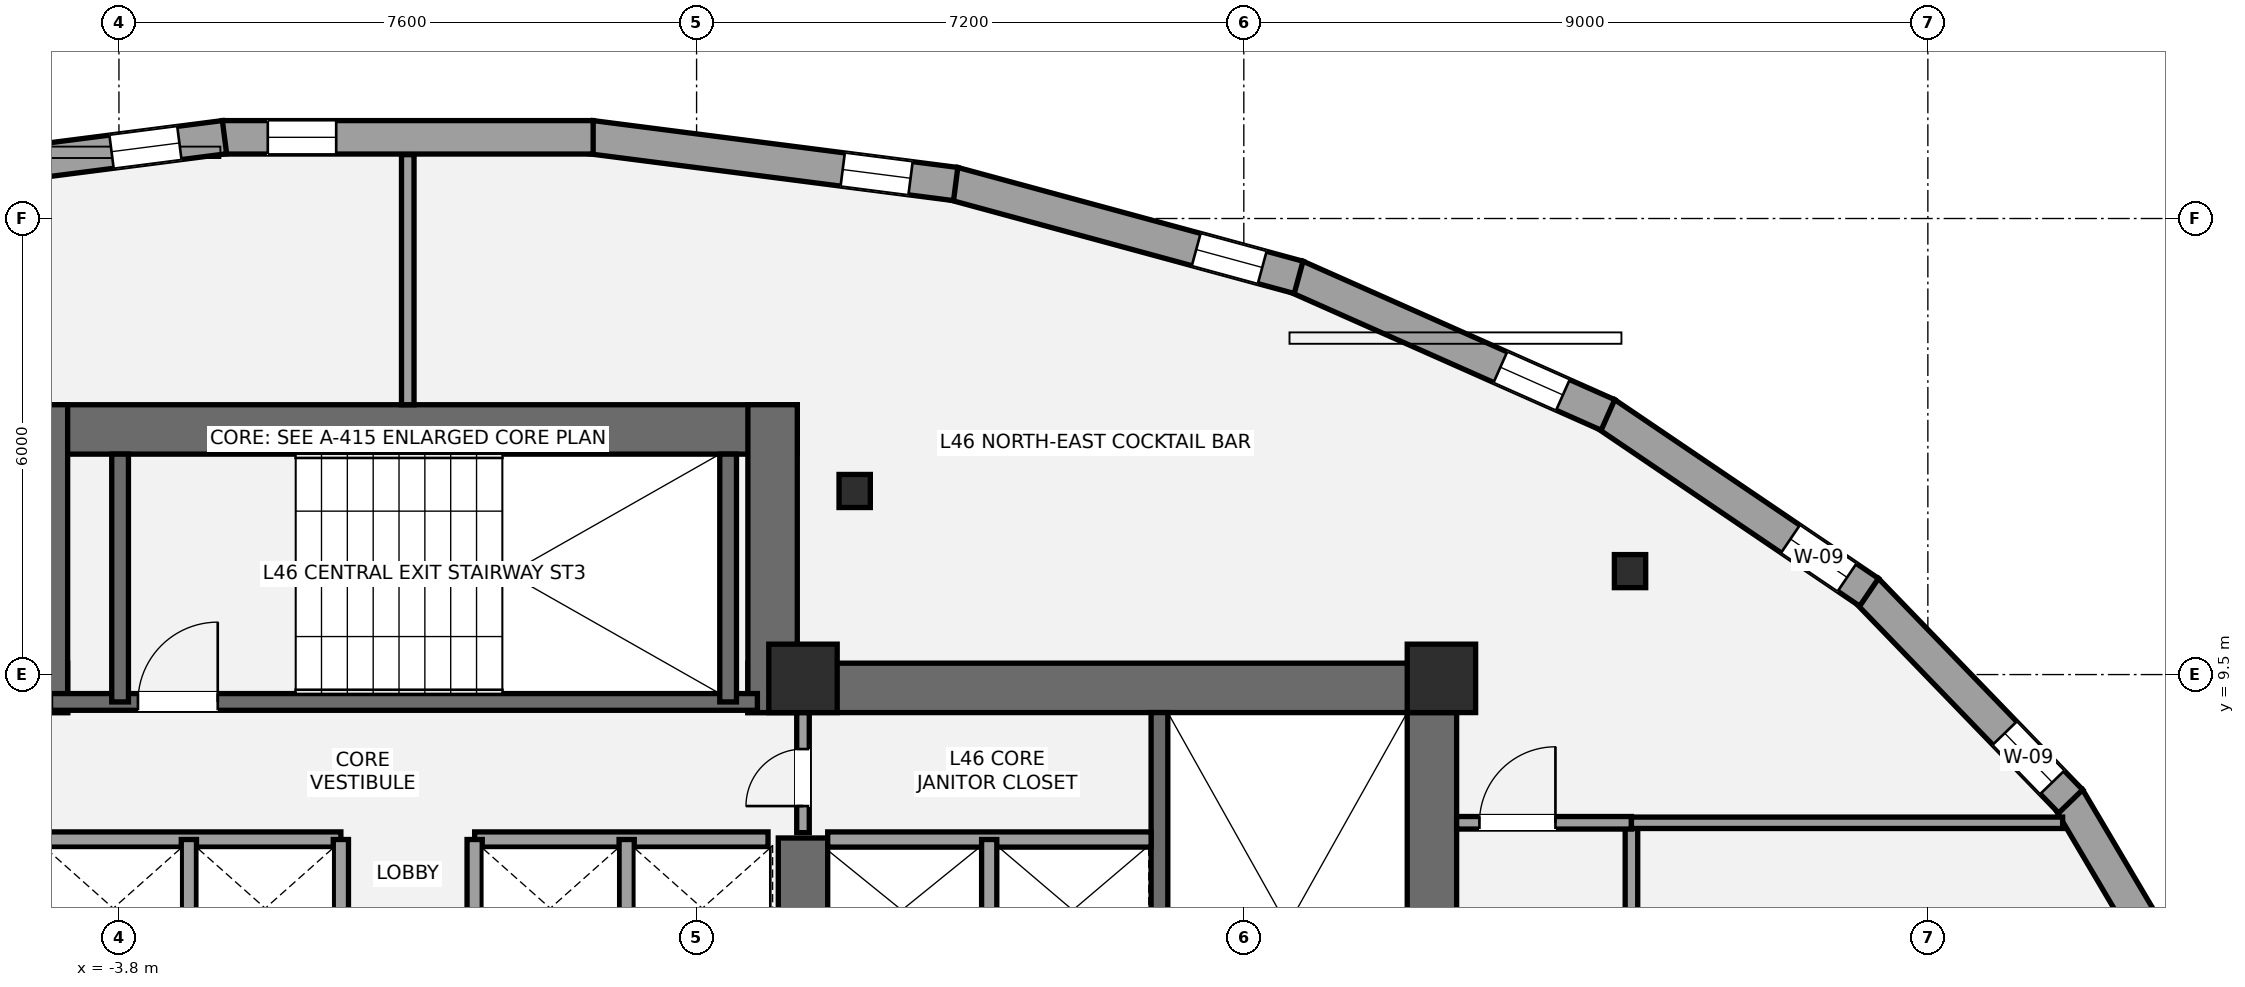
"""IFC4 building model, lengths in metres.
Left out: names, types, materials, properties, quantities, classifications, styles, units other than length and angle.
Written with IfcOpenShell. Run it as: python <this file> out.ifc"""

import sys

from ifc_helpers import new_model, si_unit, direction, frame, frame_2d, origin, origin_2d, place, context, subcontext, project, spatial, rectangle, i_section, extrude, element, fill, save


model = new_model("IFC4")
c1 = context("Model", 3, precision=1e-05, world=origin(), true_north=direction((0.0, 1.0)))
c2 = subcontext(c1, "Body", "Model", "MODEL_VIEW")
j1 = project(units=[si_unit("LENGTHUNIT", "METRE"), si_unit("PLANEANGLEUNIT", "RADIAN")], contexts=[c1])
p1 = place(None, origin())
s1 = spatial("IfcSite", under=j1, at=p1, CompositionType="ELEMENT")
p2 = place(p1, origin())
s2 = spatial("IfcBuilding", under=s1, at=p2, CompositionType="ELEMENT")
p3 = place(p2, frame((0.0, 0.0, 169.4)))
s3 = spatial("IfcBuildingStorey", under=s2, at=p3, CompositionType="ELEMENT", Elevation=169.4)
p4 = place(p3, frame((-13.8, 9.325, 0.0), z_axis=(0.0, 0.0, 1.0), x_axis=(1.0, 0.0, 0.0)))
e1 = element("IfcWall", 1, at=p4, inside=s3, PredefinedType="SHEAR", context=c2, shape_type="SweptSolid", body=[
    extrude(rectangle(XDim=9.325, YDim=0.65, at=frame_2d((4.663, 0.0))), origin(), (0.0, 0.0, 1.0), 3.2),
])
p5 = place(p3, frame((13.475, 1.2, 0.0), z_axis=(0.0, 0.0, 1.0), x_axis=(0.0, 1.0, 0.0)))
e2 = element("IfcWall", 2, at=p5, inside=s3, PredefinedType="SHEAR", context=c2, shape_type="SweptSolid", body=[
    extrude(rectangle(XDim=8.45, YDim=0.65, at=frame_2d((4.225, 0.0))), origin(), (0.0, 0.0, 1.0), 3.2),
])
p6 = place(p3, frame((4.475, 9.325, 0.0), z_axis=(0.0, 0.0, 1.0), x_axis=(1.0, 0.0, 0.0)))
e3 = element("IfcWall", 3, at=p6, inside=s3, PredefinedType="SHEAR", context=c2, shape_type="SweptSolid", body=[
    extrude(rectangle(XDim=9.325, YDim=0.65, at=frame_2d((4.663, 0.0))), origin(), (0.0, 0.0, 1.0), 3.2),
])
p7 = place(p3, frame((5.2, 5.35, 0.0), z_axis=(0.0, 0.0, 1.0), x_axis=(0.0, 1.0, 0.0)))
e4 = element("IfcWall", 4, at=p7, inside=s3, PredefinedType="SHEAR", context=c2, shape_type="SweptSolid", body=[
    extrude(rectangle(XDim=2.0, YDim=0.65, at=frame_2d((1.0, 0.0))), origin(), (0.0, 0.0, 1.0), 3.2),
])
p8 = place(p3, frame((9.89, 1.85, 0.0), z_axis=(0.0, 0.0, 1.0), x_axis=(0.0, 1.0, 0.0)))
e5 = element("IfcWall", 5, at=p8, inside=s3, PredefinedType="SHEAR", context=c2, shape_type="SweptSolid", body=[
    extrude(rectangle(XDim=7.15, YDim=0.22, at=frame_2d((3.575, 0.0))), origin(), (0.0, 0.0, 1.0), 3.2),
])
p9 = place(p3, frame((-5.125, 12.725, 0.0), z_axis=(0.0, 0.0, 1.0), x_axis=(1.0, 0.0, 0.0)))
e6 = element("IfcWall", 6, at=p9, inside=s3, PredefinedType="SHEAR", context=c2, shape_type="SweptSolid", body=[
    extrude(rectangle(XDim=10.25, YDim=0.65, at=frame_2d((5.125, 0.0))), origin(), (0.0, 0.0, 1.0), 3.2),
])
for number, where, z_axis, x_axis in (
    (7, (-4.8, 9.0, 0.0), (0.0, 0.0, 1.0), (0.0, 1.0, 0.0)),
    (8, (4.8, 9.0, 0.0), (0.0, 0.0, 1.0), (0.0, 1.0, 0.0)),
):
    element("IfcWall", number, at=place(p3, frame(where, z_axis=z_axis, x_axis=x_axis)), inside=s3, PredefinedType="SHEAR", context=c2, shape_type="SweptSolid", body=[
        extrude(rectangle(XDim=4.05, YDim=0.65, at=frame_2d((2.025, 0.0))), origin(), (0.0, 0.0, 1.0), 3.2),
    ])
p10 = place(p3, frame((-4.7, 9.14, 0.0), z_axis=(0.0, 0.0, 1.0), x_axis=(1.0, 0.0, 0.0)))
e9 = element("IfcWall", 9, at=p10, inside=s3, PredefinedType="SHEAR", context=c2, shape_type="SweptSolid", body=[
    extrude(rectangle(XDim=9.3, YDim=0.22, at=frame_2d((4.65, 0.0))), origin(), (0.0, 0.0, 1.0), 3.2),
])
p11 = place(p10, frame((1.15, 0.0, 0.0)))
e10 = element("IfcOpeningElement", 10, at=p11, cuts=e9, PredefinedType="OPENING", context=c2, shape_type="SweptSolid", body=[
    extrude(rectangle(XDim=1.05, YDim=2.15, at=frame_2d((0.525, 1.075))), frame((0.0, 0.12, 0.0), z_axis=(0.0, -1.0, 0.0), x_axis=(1.0, 0.0, 0.0)), (0.0, 0.0, 1.0), 0.24),
])
for number, where, z_axis, x_axis in (
    (11, (-3.785, 9.14, 0.0), (0.0, 0.0, 1.0), (0.0, 1.0, 0.0)),
    (12, (4.215, 9.14, 0.0), (0.0, 0.0, 1.0), (0.0, 1.0, 0.0)),
):
    element("IfcWall", number, at=place(p3, frame(where, z_axis=z_axis, x_axis=x_axis)), inside=s3, PredefinedType="SHEAR", context=c2, shape_type="SweptSolid", body=[
        extrude(rectangle(XDim=3.26, YDim=0.22, at=frame_2d((1.63, 0.0))), origin(), (0.0, 0.0, 1.0), 3.2),
    ])
for number, where, z_axis, x_axis in (
    (13, (5.2, 9.45, 0.0), (0.0, 0.0, 1.0), (1.0, 0.0, 0.0)),
    (14, (13.6, 9.45, 0.0), (0.0, 0.0, 1.0), (1.0, 0.0, 0.0)),
):
    element("IfcColumn", number, at=place(p3, frame(where, z_axis=z_axis, x_axis=x_axis)), inside=s3, PredefinedType="COLUMN", context=c2, shape_type="SweptSolid", body=[
        extrude(rectangle(XDim=0.9, YDim=0.9, at=origin_2d()), origin(), (0.0, 0.0, 1.0), 3.2),
    ])
for number, where, z_axis, x_axis in (
    (15, (16.082, 10.861, 0.0), (0.0, 0.0, 1.0), (1.0, 0.0, 0.0)),
    (16, (5.88, 11.915, 0.0), (0.0, 0.0, 1.0), (1.0, 0.0, 0.0)),
):
    element("IfcColumn", number, at=place(p3, frame(where, z_axis=z_axis, x_axis=x_axis)), inside=s3, PredefinedType="COLUMN", context=c2, shape_type="SweptSolid", body=[
        extrude(i_section(OverallWidth=0.412, OverallDepth=0.435, WebThickness=0.036, FlangeThickness=0.057, at=origin_2d()), origin(), (0.0, 0.0, 1.0), 3.2),
    ])
p12 = place(p3, frame((21.847, 7.873, 0.0), z_axis=(0.0, 0.0, 1.0), x_axis=(0.508883387051, -0.860835465338, 0.0)))
e17 = element("IfcWall", 17, at=p12, inside=s3, PredefinedType="STANDARD", context=c2, shape_type="SweptSolid", body=[
    extrude(rectangle(XDim=3.577, YDim=0.44, at=frame_2d((1.788, 0.0))), origin(), (0.0, 0.0, 1.0), 2.315),
])
p13 = place(p3, frame((19.192, 10.612, 0.0), z_axis=(0.0, 0.0, 1.0), x_axis=(0.694975307772, -0.719033602544, 0.0)))
e18 = element("IfcWall", 18, at=p13, inside=s3, PredefinedType="STANDARD", context=c2, shape_type="SweptSolid", body=[
    extrude(rectangle(XDim=3.866, YDim=0.44, at=frame_2d((1.933, 0.0))), origin(), (0.0, 0.0, 1.0), 2.315),
])
p14 = place(p13, frame((2.618, 0.0, 0.58)))
e19 = element("IfcOpeningElement", 19, at=p14, cuts=e18, PredefinedType="OPENING", context=c2, shape_type="SweptSolid", body=[
    extrude(rectangle(XDim=0.9, YDim=1.35, at=frame_2d((0.45, 0.675))), frame((0.0, 0.23, 0.0), z_axis=(0.0, -1.0, 0.0), x_axis=(1.0, 0.0, 0.0)), (0.0, 0.0, 1.0), 0.46),
])
p15 = place(p3, frame((15.757, 12.935, 0.0), z_axis=(0.0, 0.0, 1.0), x_axis=(0.827760762475, -0.561081206338, 0.0)))
e20 = element("IfcWall", 20, at=p15, inside=s3, PredefinedType="STANDARD", context=c2, shape_type="SweptSolid", body=[
    extrude(rectangle(XDim=4.192, YDim=0.44, at=frame_2d((2.096, 0.0))), origin(), (0.0, 0.0, 1.0), 2.319),
])
p16 = place(p15, frame((2.942, 0.0, 0.58)))
e21 = element("IfcOpeningElement", 21, at=p16, cuts=e20, PredefinedType="OPENING", context=c2, shape_type="SweptSolid", body=[
    extrude(rectangle(XDim=0.9, YDim=1.35, at=frame_2d((0.45, 0.675))), frame((0.0, 0.23, 0.0), z_axis=(0.0, -1.0, 0.0), x_axis=(1.0, 0.0, 0.0)), (0.0, 0.0, 1.0), 0.46),
])
p17 = place(p3, frame((11.69, 14.737, 0.0), z_axis=(0.0, 0.0, 1.0), x_axis=(0.913907994914, -0.405921392431, 0.0)))
e22 = element("IfcWall", 22, at=p17, inside=s3, PredefinedType="STANDARD", context=c2, shape_type="SweptSolid", body=[
    extrude(rectangle(XDim=4.487, YDim=0.44, at=frame_2d((2.244, 0.0))), origin(), (0.0, 0.0, 1.0), 2.315),
])
p18 = place(p17, frame((2.939, 0.0, 0.58)))
e23 = element("IfcOpeningElement", 23, at=p18, cuts=e22, PredefinedType="OPENING", context=c2, shape_type="SweptSolid", body=[
    extrude(rectangle(XDim=0.9, YDim=1.35, at=frame_2d((0.45, 0.675))), frame((0.0, 0.23, 0.0), z_axis=(0.0, -1.0, 0.0), x_axis=(1.0, 0.0, 0.0)), (0.0, 0.0, 1.0), 0.46),
])
p19 = place(p3, frame((7.179, 15.959, 0.0), z_axis=(0.0, 0.0, 1.0), x_axis=(0.965037424263, -0.262112132058, 0.0)))
e24 = element("IfcWall", 24, at=p19, inside=s3, PredefinedType="STANDARD", context=c2, shape_type="SweptSolid", body=[
    extrude(rectangle(XDim=4.707, YDim=0.44, at=frame_2d((2.353, 0.0))), origin(), (0.0, 0.0, 1.0), 2.315),
])
p20 = place(p19, frame((3.31, 0.0, 0.58)))
e25 = element("IfcOpeningElement", 25, at=p20, cuts=e24, PredefinedType="OPENING", context=c2, shape_type="SweptSolid", body=[
    extrude(rectangle(XDim=0.9, YDim=1.35, at=frame_2d((0.45, 0.675))), frame((0.0, 0.23, 0.0), z_axis=(0.0, -1.0, 0.0), x_axis=(1.0, 0.0, 0.0)), (0.0, 0.0, 1.0), 0.46),
])
p21 = place(p3, frame((2.411, 16.57, 0.0), z_axis=(0.0, 0.0, 1.0), x_axis=(0.991852910824, -0.127388395426, 0.0)))
e26 = element("IfcWall", 26, at=p21, inside=s3, PredefinedType="STANDARD", context=c2, shape_type="SweptSolid", body=[
    extrude(rectangle(XDim=4.837, YDim=0.44, at=frame_2d((2.418, 0.0))), origin(), (0.0, 0.0, 1.0), 2.315),
])
p22 = place(p21, frame((3.339, 0.0, 0.58)))
e27 = element("IfcOpeningElement", 27, at=p22, cuts=e26, PredefinedType="OPENING", context=c2, shape_type="SweptSolid", body=[
    extrude(rectangle(XDim=0.9, YDim=1.35, at=frame_2d((0.45, 0.675))), frame((0.0, 0.23, 0.0), z_axis=(0.0, -1.0, 0.0), x_axis=(1.0, 0.0, 0.0)), (0.0, 0.0, 1.0), 0.46),
])
p23 = place(p3, frame((-2.439, 16.568, 0.0), z_axis=(0.0, 0.0, 1.0), x_axis=(1.0, 0.0, 0.0)))
e28 = element("IfcWall", 28, at=p23, inside=s3, PredefinedType="STANDARD", context=c2, shape_type="SweptSolid", body=[
    extrude(rectangle(XDim=4.878, YDim=0.44, at=frame_2d((2.439, 0.0))), origin(), (0.0, 0.0, 1.0), 2.315),
])
p24 = place(p23, frame((0.598, 0.0, 0.58)))
e29 = element("IfcOpeningElement", 29, at=p24, cuts=e28, PredefinedType="OPENING", context=c2, shape_type="SweptSolid", body=[
    extrude(rectangle(XDim=0.9, YDim=1.35, at=frame_2d((0.45, 0.675))), frame((0.0, 0.23, 0.0), z_axis=(0.0, -1.0, 0.0), x_axis=(1.0, 0.0, 0.0)), (0.0, 0.0, 1.0), 0.46),
])
p25 = place(p3, frame((-7.209, 15.954, 0.0), z_axis=(0.0, 0.0, 1.0), x_axis=(0.991852910824, 0.127388395426, 0.0)))
e30 = element("IfcWall", 30, at=p25, inside=s3, PredefinedType="STANDARD", context=c2, shape_type="SweptSolid", body=[
    extrude(rectangle(XDim=4.837, YDim=0.44, at=frame_2d((2.418, 0.0))), origin(), (0.0, 0.0, 1.0), 2.315),
])
p26 = place(p25, frame((3.339, 0.0, 0.58)))
e31 = element("IfcOpeningElement", 31, at=p26, cuts=e30, PredefinedType="OPENING", context=c2, shape_type="SweptSolid", body=[
    extrude(rectangle(XDim=0.9, YDim=1.35, at=frame_2d((0.45, 0.675))), frame((0.0, 0.23, 0.0), z_axis=(0.0, -1.0, 0.0), x_axis=(1.0, 0.0, 0.0)), (0.0, 0.0, 1.0), 0.46),
])
p27 = place(p3, frame((5.525, 7.33, 0.0), z_axis=(0.0, 0.0, 1.0), x_axis=(1.0, 0.0, 0.0)))
e32 = element("IfcWall", 32, at=p27, inside=s3, PredefinedType="SOLIDWALL", context=c2, shape_type="SweptSolid", body=[
    extrude(rectangle(XDim=4.255, YDim=0.2, at=frame_2d((2.127, 0.0))), origin(), (0.0, 0.0, 1.0), 3.02),
])
p28 = place(p3, frame((7.65, 5.47, 0.0), z_axis=(0.0, 0.0, 1.0), x_axis=(0.0, 1.0, 0.0)))
e33 = element("IfcWall", 33, at=p28, inside=s3, PredefinedType="SOLIDWALL", context=c2, shape_type="SweptSolid", body=[
    extrude(rectangle(XDim=1.86, YDim=0.2, at=frame_2d((0.93, 0.0))), origin(), (0.0, 0.0, 1.0), 3.02),
])
for number, where, z_axis, x_axis in (
    (34, (-4.74, 7.33, 0.0), (0.0, 0.0, 1.0), (1.0, 0.0, 0.0)),
    (35, (0.88, 7.33, 0.0), (0.0, 0.0, 1.0), (1.0, 0.0, 0.0)),
):
    element("IfcWall", number, at=place(p3, frame(where, z_axis=z_axis, x_axis=x_axis)), inside=s3, PredefinedType="SOLIDWALL", context=c2, shape_type="SweptSolid", body=[
        extrude(rectangle(XDim=3.86, YDim=0.2, at=frame_2d((1.93, 0.0))), origin(), (0.0, 0.0, 1.0), 3.02),
    ])
for number, where, z_axis, x_axis in (
    (36, (-2.88, 5.52, 0.0), (0.0, 0.0, 1.0), (0.0, 1.0, 0.0)),
    (37, (2.88, 5.52, 0.0), (0.0, 0.0, 1.0), (0.0, 1.0, 0.0)),
    (38, (-0.88, 5.52, 0.0), (0.0, 0.0, 1.0), (0.0, 1.0, 0.0)),
    (39, (0.88, 5.52, 0.0), (0.0, 0.0, 1.0), (0.0, 1.0, 0.0)),
):
    element("IfcWall", number, at=place(p3, frame(where, z_axis=z_axis, x_axis=x_axis)), inside=s3, PredefinedType="SOLIDWALL", context=c2, shape_type="SweptSolid", body=[
        extrude(rectangle(XDim=1.81, YDim=0.2, at=frame_2d((0.905, 0.0))), origin(), (0.0, 0.0, 1.0), 3.02),
    ])
p29 = place(p3, frame((5.2, 7.42, 0.0), z_axis=(0.0, 0.0, 1.0), x_axis=(0.0, 1.0, 0.0)))
e40 = element("IfcWall", 40, at=p29, inside=s3, PredefinedType="PARTITIONING", context=c2, shape_type="SweptSolid", body=[
    extrude(rectangle(XDim=1.58, YDim=0.165, at=frame_2d((0.79, 0.0))), origin(), (0.0, 0.0, 1.0), 3.02),
])
p30 = place(p29, frame((0.35, 0.0, 0.0)))
e41 = element("IfcOpeningElement", 41, at=p30, cuts=e40, PredefinedType="OPENING", context=c2, shape_type="SweptSolid", body=[
    extrude(rectangle(XDim=0.75, YDim=2.1, at=frame_2d((0.375, 1.05))), frame((0.0, 0.093, 0.0), z_axis=(0.0, -1.0, 0.0), x_axis=(1.0, 0.0, 0.0)), (0.0, 0.0, 1.0), 0.185),
])
p31 = place(p3, frame((16.1, -12.427, 0.0), z_axis=(0.0, 0.0, 1.0), x_axis=(0.0, 1.0, 0.0)))
e42 = element("IfcWall", 42, at=p31, inside=s3, PredefinedType="PARTITIONING", context=c2, shape_type="SweptSolid", body=[
    extrude(rectangle(XDim=19.977, YDim=0.165, at=frame_2d((9.988, 0.0))), origin(), (0.0, 0.0, 1.0), 2.473),
])
p32 = place(p31, frame((4.477, 0.0, 0.0)))
e43 = element("IfcOpeningElement", 43, at=p32, cuts=e42, PredefinedType="OPENING", context=c2, shape_type="SweptSolid", body=[
    extrude(rectangle(XDim=0.85, YDim=2.1, at=frame_2d((0.425, 1.05))), frame((0.0, 0.093, 0.0), z_axis=(0.0, -1.0, 0.0), x_axis=(1.0, 0.0, 0.0)), (0.0, 0.0, 1.0), 0.185),
])
p33 = place(p31, frame((8.367, 0.0, 0.0)))
e44 = element("IfcOpeningElement", 44, at=p33, cuts=e42, PredefinedType="OPENING", context=c2, shape_type="SweptSolid", body=[
    extrude(rectangle(XDim=1.0, YDim=2.15, at=frame_2d((0.5, 1.075))), frame((0.0, 0.093, 0.0), z_axis=(0.0, -1.0, 0.0), x_axis=(1.0, 0.0, 0.0)), (0.0, 0.0, 1.0), 0.185),
])
p34 = place(p31, frame((13.027, 0.0, 0.0)))
e45 = element("IfcOpeningElement", 45, at=p34, cuts=e42, PredefinedType="OPENING", context=c2, shape_type="SweptSolid", body=[
    extrude(rectangle(XDim=1.0, YDim=2.15, at=frame_2d((0.5, 1.075))), frame((0.0, 0.093, 0.0), z_axis=(0.0, -1.0, 0.0), x_axis=(1.0, 0.0, 0.0)), (0.0, 0.0, 1.0), 0.185),
])
p35 = place(p31, frame((17.302, 0.0, 0.0)))
e46 = element("IfcOpeningElement", 46, at=p35, cuts=e42, PredefinedType="OPENING", context=c2, shape_type="SweptSolid", body=[
    extrude(rectangle(XDim=1.0, YDim=2.15, at=frame_2d((0.5, 1.075))), frame((0.0, 0.093, 0.0), z_axis=(0.0, -1.0, 0.0), x_axis=(1.0, 0.0, 0.0)), (0.0, 0.0, 1.0), 0.185),
])
p36 = place(p3, frame((13.8, 7.55, 0.0), z_axis=(0.0, 0.0, 1.0), x_axis=(1.0, 0.0, 0.0)))
e47 = element("IfcWall", 47, at=p36, inside=s3, PredefinedType="PARTITIONING", context=c2, shape_type="SweptSolid", body=[
    extrude(rectangle(XDim=2.3, YDim=0.165, at=frame_2d((1.15, 0.0))), origin(), (0.0, 0.0, 1.0), 2.473),
])
p37 = place(p36, frame((0.3, 0.0, 0.0)))
e48 = element("IfcOpeningElement", 48, at=p37, cuts=e47, PredefinedType="OPENING", context=c2, shape_type="SweptSolid", body=[
    extrude(rectangle(XDim=1.0, YDim=2.15, at=frame_2d((0.5, 1.075))), frame((0.0, 0.093, 0.0), z_axis=(0.0, -1.0, 0.0), x_axis=(1.0, 0.0, 0.0)), (0.0, 0.0, 1.0), 0.185),
])
p38 = place(p3, frame((16.1, 7.55, 0.0), z_axis=(0.0, 0.0, 1.0), x_axis=(1.0, 0.0, 0.0)))
e49 = element("IfcWall", 49, at=p38, inside=s3, PredefinedType="PLUMBINGWALL", context=c2, shape_type="SweptSolid", body=[
    extrude(rectangle(XDim=5.673, YDim=0.15, at=frame_2d((2.836, 0.0))), origin(), (0.0, 0.0, 1.0), 2.473),
])
p39 = place(p3, frame((0.0, 13.05, 0.0), z_axis=(0.0, 0.0, 1.0), x_axis=(0.0, 1.0, 0.0)))
e50 = element("IfcWall", 50, at=p39, inside=s3, PredefinedType="PARTITIONING", context=c2, shape_type="SweptSolid", body=[
    extrude(rectangle(XDim=3.29, YDim=0.165, at=frame_2d((1.645, 0.0))), origin(), (0.0, 0.0, 1.0), 3.02),
])
p40 = place(p14, origin())
e51 = element("IfcWindow", 51, at=p40, inside=s3, PartitioningType="SINGLE_PANEL", PredefinedType="WINDOW", context=c2, shape_type="SweptSolid", body=[
    extrude(rectangle(XDim=0.9, YDim=1.35, at=frame_2d((0.45, 0.675))), frame((0.0, -0.01, 0.0), z_axis=(0.0, -1.0, 0.0), x_axis=(1.0, 0.0, 0.0)), (0.0, 0.0, 1.0), 0.06),
])
fill(e19, e51)
p41 = place(p16, origin())
e52 = element("IfcWindow", 52, at=p41, inside=s3, PartitioningType="SINGLE_PANEL", PredefinedType="WINDOW", context=c2, shape_type="SweptSolid", body=[
    extrude(rectangle(XDim=0.9, YDim=1.35, at=frame_2d((0.45, 0.675))), frame((0.0, -0.01, 0.0), z_axis=(0.0, -1.0, 0.0), x_axis=(1.0, 0.0, 0.0)), (0.0, 0.0, 1.0), 0.06),
])
fill(e21, e52)
p42 = place(p18, origin())
e53 = element("IfcWindow", 53, at=p42, inside=s3, PartitioningType="SINGLE_PANEL", PredefinedType="WINDOW", context=c2, shape_type="SweptSolid", body=[
    extrude(rectangle(XDim=0.9, YDim=1.35, at=frame_2d((0.45, 0.675))), frame((0.0, -0.01, 0.0), z_axis=(0.0, -1.0, 0.0), x_axis=(1.0, 0.0, 0.0)), (0.0, 0.0, 1.0), 0.06),
])
fill(e23, e53)
p43 = place(p20, origin())
e54 = element("IfcWindow", 54, at=p43, inside=s3, PartitioningType="SINGLE_PANEL", PredefinedType="WINDOW", context=c2, shape_type="SweptSolid", body=[
    extrude(rectangle(XDim=0.9, YDim=1.35, at=frame_2d((0.45, 0.675))), frame((0.0, -0.01, 0.0), z_axis=(0.0, -1.0, 0.0), x_axis=(1.0, 0.0, 0.0)), (0.0, 0.0, 1.0), 0.06),
])
fill(e25, e54)
p44 = place(p22, origin())
e55 = element("IfcWindow", 55, at=p44, inside=s3, PartitioningType="SINGLE_PANEL", PredefinedType="WINDOW", context=c2, shape_type="SweptSolid", body=[
    extrude(rectangle(XDim=0.9, YDim=1.35, at=frame_2d((0.45, 0.675))), frame((0.0, -0.01, 0.0), z_axis=(0.0, -1.0, 0.0), x_axis=(1.0, 0.0, 0.0)), (0.0, 0.0, 1.0), 0.06),
])
fill(e27, e55)
p45 = place(p24, origin())
e56 = element("IfcWindow", 56, at=p45, inside=s3, PartitioningType="SINGLE_PANEL", PredefinedType="WINDOW", context=c2, shape_type="SweptSolid", body=[
    extrude(rectangle(XDim=0.9, YDim=1.35, at=frame_2d((0.45, 0.675))), frame((0.0, -0.01, 0.0), z_axis=(0.0, -1.0, 0.0), x_axis=(1.0, 0.0, 0.0)), (0.0, 0.0, 1.0), 0.06),
])
fill(e29, e56)
p46 = place(p26, origin())
e57 = element("IfcWindow", 57, at=p46, inside=s3, PartitioningType="SINGLE_PANEL", PredefinedType="WINDOW", context=c2, shape_type="SweptSolid", body=[
    extrude(rectangle(XDim=0.9, YDim=1.35, at=frame_2d((0.45, 0.675))), frame((0.0, -0.01, 0.0), z_axis=(0.0, -1.0, 0.0), x_axis=(1.0, 0.0, 0.0)), (0.0, 0.0, 1.0), 0.06),
])
fill(e31, e57)
p47 = place(p11, origin())
e58 = element("IfcDoor", 58, at=p47, inside=s3, OperationType="SINGLE_SWING_RIGHT", PredefinedType="DOOR", context=c2, shape_type="SweptSolid", body=[
    extrude(rectangle(XDim=1.05, YDim=2.15, at=frame_2d((0.525, 1.075))), frame((0.0, 0.025, 0.0), z_axis=(0.0, -1.0, 0.0), x_axis=(1.0, 0.0, 0.0)), (0.0, 0.0, 1.0), 0.05),
])
fill(e10, e58)
p48 = place(p30, origin())
e59 = element("IfcDoor", 59, at=p48, inside=s3, OperationType="SINGLE_SWING_LEFT", PredefinedType="DOOR", context=c2, shape_type="SweptSolid", body=[
    extrude(rectangle(XDim=0.75, YDim=2.1, at=frame_2d((0.375, 1.05))), frame((0.0, 0.025, 0.0), z_axis=(0.0, -1.0, 0.0), x_axis=(1.0, 0.0, 0.0)), (0.0, 0.0, 1.0), 0.05),
])
fill(e41, e59)
p49 = place(p37, origin())
e60 = element("IfcDoor", 60, at=p49, inside=s3, OperationType="SINGLE_SWING_RIGHT", PredefinedType="DOOR", context=c2, shape_type="SweptSolid", body=[
    extrude(rectangle(XDim=1.0, YDim=2.15, at=frame_2d((0.5, 1.075))), frame((0.0, 0.025, 0.0), z_axis=(0.0, -1.0, 0.0), x_axis=(1.0, 0.0, 0.0)), (0.0, 0.0, 1.0), 0.05),
])
fill(e48, e60)
save(model, sys.argv[1])
